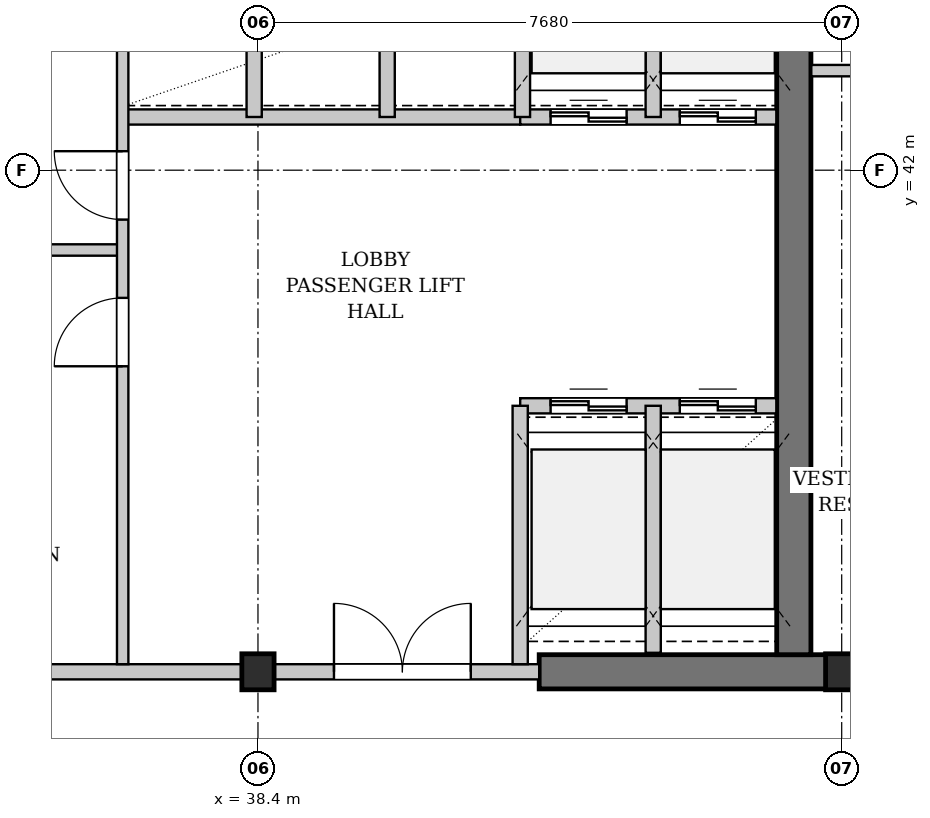
"""IFC4 building model, lengths in metres.
Left out: names, types, materials, properties, quantities, classifications, styles, units other than length and angle.
Written with IfcOpenShell. Run it as: python <this file> out.ifc"""

import sys

from ifc_helpers import new_model, si_unit, direction, frame, frame_2d, origin, origin_2d, place, context, subcontext, project, spatial, rectangle, i_section, extrude, element, fill, save


model = new_model("IFC4")
c1 = context("Model", 3, precision=1e-05, world=origin(), true_north=direction((0.0, 1.0)))
c2 = subcontext(c1, "Body", "Model", "MODEL_VIEW")
j1 = project(units=[si_unit("LENGTHUNIT", "METRE"), si_unit("PLANEANGLEUNIT", "RADIAN")], contexts=[c1])
p1 = place(None, origin())
s1 = spatial("IfcSite", under=j1, at=p1, CompositionType="ELEMENT")
p2 = place(p1, origin())
s2 = spatial("IfcBuilding", under=s1, at=p2, CompositionType="ELEMENT")
p3 = place(p2, frame((0.0, 0.0, 137.3)))
s3 = spatial("IfcBuildingStorey", under=s2, at=p3, CompositionType="ELEMENT", Elevation=137.3)
p4 = place(p3, frame((42.1, 35.4, 0.0), z_axis=(0.0, 0.0, 1.0), x_axis=(1.0, 0.0, 0.0)))
e1 = element("IfcWall", 1, at=p4, inside=s3, PredefinedType="SHEAR", context=c2, shape_type="SweptSolid", body=[
    extrude(rectangle(XDim=8.05, YDim=0.45, at=frame_2d((4.025, 0.0))), origin(), (0.0, 0.0, 1.0), 3.68),
])
p5 = place(p4, frame((4.85, 0.0, 0.0)))
e2 = element("IfcOpeningElement", 2, at=p5, cuts=e1, PredefinedType="OPENING", context=c2, shape_type="SweptSolid", body=[
    extrude(rectangle(XDim=0.9, YDim=2.15, at=frame_2d((0.45, 1.075))), frame((0.0, 0.235, 0.0), z_axis=(0.0, -1.0, 0.0), x_axis=(1.0, 0.0, 0.0)), (0.0, 0.0, 1.0), 0.47),
])
p6 = place(p3, frame((45.45, 35.625, 0.0), z_axis=(0.0, 0.0, 1.0), x_axis=(0.0, 1.0, 0.0)))
e3 = element("IfcWall", 3, at=p6, inside=s3, PredefinedType="SHEAR", context=c2, shape_type="SweptSolid", body=[
    extrude(rectangle(XDim=10.35, YDim=0.45, at=frame_2d((5.175, 0.0))), origin(), (0.0, 0.0, 1.0), 3.68),
])
for number, where, z_axis, x_axis in (
    (4, (38.4, 35.4, 0.0), (0.0, 0.0, 1.0), (1.0, 0.0, 0.0)),
    (5, (46.08, 35.4, 0.0), (0.0, 0.0, 1.0), (1.0, 0.0, 0.0)),
):
    element("IfcColumn", number, at=place(p3, frame(where, z_axis=z_axis, x_axis=x_axis)), inside=s3, PredefinedType="COLUMN", context=c2, shape_type="SweptSolid", body=[
        extrude(i_section(OverallWidth=0.424, OverallDepth=0.474, WebThickness=0.047, FlangeThickness=0.077, FilletRadius=0.015, at=origin_2d()), origin(), (0.0, 0.0, 1.0), 3.9),
    ])
p7 = place(p3, frame((35.6, 35.4, 0.0), z_axis=(0.0, 0.0, 1.0), x_axis=(1.0, 0.0, 0.0)))
e6 = element("IfcWall", 6, at=p7, inside=s3, PredefinedType="PARTITIONING", context=c2, shape_type="SweptSolid", body=[
    extrude(rectangle(XDim=6.5, YDim=0.2, at=frame_2d((3.25, 0.0))), origin(), (0.0, 0.0, 1.0), 2.765),
])
p8 = place(p7, frame((3.8, 0.0, 0.0)))
e7 = element("IfcOpeningElement", 7, at=p8, cuts=e6, PredefinedType="OPENING", context=c2, shape_type="SweptSolid", body=[
    extrude(rectangle(XDim=1.8, YDim=2.3, at=frame_2d((0.9, 1.15))), frame((0.0, 0.11, 0.0), z_axis=(0.0, -1.0, 0.0), x_axis=(1.0, 0.0, 0.0)), (0.0, 0.0, 1.0), 0.22),
])
p9 = place(p3, frame((36.6, 42.7, 0.0), z_axis=(0.0, 0.0, 1.0), x_axis=(1.0, 0.0, 0.0)))
e8 = element("IfcWall", 8, at=p9, inside=s3, PredefinedType="PARTITIONING", context=c2, shape_type="SweptSolid", body=[
    extrude(rectangle(XDim=5.25, YDim=0.2, at=frame_2d((2.625, 0.0))), origin(), (0.0, 0.0, 1.0), 3.68),
])
p10 = place(p3, frame((38.35, 42.7, 0.0), z_axis=(0.0, 0.0, 1.0), x_axis=(0.0, 1.0, 0.0)))
e9 = element("IfcWall", 9, at=p10, inside=s3, PredefinedType="PARTITIONING", context=c2, shape_type="SweptSolid", body=[
    extrude(rectangle(XDim=3.22, YDim=0.2, at=frame_2d((1.61, 0.0))), origin(), (0.0, 0.0, 1.0), 2.765),
])
p11 = place(p3, frame((40.1, 42.7, 0.0), z_axis=(0.0, 0.0, 1.0), x_axis=(0.0, 1.0, 0.0)))
e10 = element("IfcWall", 10, at=p11, inside=s3, PredefinedType="PARTITIONING", context=c2, shape_type="SweptSolid", body=[
    extrude(rectangle(XDim=3.22, YDim=0.2, at=frame_2d((1.61, 0.0))), origin(), (0.0, 0.0, 1.0), 3.68),
])
p12 = place(p3, frame((33.05, 40.95, 0.0), z_axis=(0.0, 0.0, 1.0), x_axis=(1.0, 0.0, 0.0)))
e11 = element("IfcWall", 11, at=p12, inside=s3, PredefinedType="PARTITIONING", context=c2, shape_type="SweptSolid", body=[
    extrude(rectangle(XDim=3.57, YDim=0.15, at=frame_2d((1.785, 0.0))), origin(), (0.0, 0.0, 1.0), 3.68),
])
p13 = place(p3, frame((36.62, 35.5, 0.0), z_axis=(0.0, 0.0, 1.0), x_axis=(0.0, 1.0, 0.0)))
e12 = element("IfcWall", 12, at=p13, inside=s3, PredefinedType="PARTITIONING", context=c2, shape_type="SweptSolid", body=[
    extrude(rectangle(XDim=10.42, YDim=0.15, at=frame_2d((5.21, 0.0))), origin(), (0.0, 0.0, 1.0), 3.68),
])
p14 = place(p13, frame((3.92, 0.0, 0.0)))
e13 = element("IfcOpeningElement", 13, at=p14, cuts=e12, PredefinedType="OPENING", context=c2, shape_type="SweptSolid", body=[
    extrude(rectangle(XDim=0.9, YDim=2.15, at=frame_2d((0.45, 1.075))), frame((0.0, 0.085, 0.0), z_axis=(0.0, -1.0, 0.0), x_axis=(1.0, 0.0, 0.0)), (0.0, 0.0, 1.0), 0.17),
])
p15 = place(p13, frame((5.85, 0.0, 0.0)))
e14 = element("IfcOpeningElement", 14, at=p15, cuts=e12, PredefinedType="OPENING", context=c2, shape_type="SweptSolid", body=[
    extrude(rectangle(XDim=0.9, YDim=2.15, at=frame_2d((0.45, 1.075))), frame((0.0, 0.085, 0.0), z_axis=(0.0, -1.0, 0.0), x_axis=(1.0, 0.0, 0.0)), (0.0, 0.0, 1.0), 0.17),
])
p16 = place(p3, frame((41.85, 38.9, 0.0), z_axis=(0.0, 0.0, 1.0), x_axis=(1.0, 0.0, 0.0)))
e15 = element("IfcWall", 15, at=p16, inside=s3, PredefinedType="PARTITIONING", context=c2, shape_type="SweptSolid", body=[
    extrude(rectangle(XDim=3.37, YDim=0.2, at=frame_2d((1.685, 0.0))), origin(), (0.0, 0.0, 1.0), 3.68),
])
p17 = place(p16, frame((0.4, 0.0, 0.0)))
e16 = element("IfcOpeningElement", 16, at=p17, cuts=e15, PredefinedType="OPENING", context=c2, shape_type="SweptSolid", body=[
    extrude(rectangle(XDim=1.0, YDim=2.2, at=frame_2d((0.5, 1.1))), frame((0.0, 0.11, 0.0), z_axis=(0.0, -1.0, 0.0), x_axis=(1.0, 0.0, 0.0)), (0.0, 0.0, 1.0), 0.22),
])
p18 = place(p16, frame((2.1, 0.0, 0.0)))
e17 = element("IfcOpeningElement", 17, at=p18, cuts=e15, PredefinedType="OPENING", context=c2, shape_type="SweptSolid", body=[
    extrude(rectangle(XDim=1.0, YDim=2.2, at=frame_2d((0.5, 1.1))), frame((0.0, 0.11, 0.0), z_axis=(0.0, -1.0, 0.0), x_axis=(1.0, 0.0, 0.0)), (0.0, 0.0, 1.0), 0.22),
])
p19 = place(p3, frame((41.85, 42.7, 0.0), z_axis=(0.0, 0.0, 1.0), x_axis=(1.0, 0.0, 0.0)))
e18 = element("IfcWall", 18, at=p19, inside=s3, PredefinedType="PARTITIONING", context=c2, shape_type="SweptSolid", body=[
    extrude(rectangle(XDim=3.37, YDim=0.2, at=frame_2d((1.685, 0.0))), origin(), (0.0, 0.0, 1.0), 3.68),
])
p20 = place(p19, frame((0.4, 0.0, 0.0)))
e19 = element("IfcOpeningElement", 19, at=p20, cuts=e18, PredefinedType="OPENING", context=c2, shape_type="SweptSolid", body=[
    extrude(rectangle(XDim=1.0, YDim=2.2, at=frame_2d((0.5, 1.1))), frame((0.0, 0.11, 0.0), z_axis=(0.0, -1.0, 0.0), x_axis=(1.0, 0.0, 0.0)), (0.0, 0.0, 1.0), 0.22),
])
p21 = place(p19, frame((2.1, 0.0, 0.0)))
e20 = element("IfcOpeningElement", 20, at=p21, cuts=e18, PredefinedType="OPENING", context=c2, shape_type="SweptSolid", body=[
    extrude(rectangle(XDim=1.0, YDim=2.2, at=frame_2d((0.5, 1.1))), frame((0.0, 0.11, 0.0), z_axis=(0.0, -1.0, 0.0), x_axis=(1.0, 0.0, 0.0)), (0.0, 0.0, 1.0), 0.22),
])
p22 = place(p3, frame((43.6, 35.65, 0.0), z_axis=(0.0, 0.0, 1.0), x_axis=(0.0, 1.0, 0.0)))
e21 = element("IfcWall", 21, at=p22, inside=s3, PredefinedType="PARTITIONING", context=c2, shape_type="SweptSolid", body=[
    extrude(rectangle(XDim=3.25, YDim=0.2, at=frame_2d((1.625, 0.0))), origin(), (0.0, 0.0, 1.0), 3.68),
])
p23 = place(p3, frame((43.6, 42.7, 0.0), z_axis=(0.0, 0.0, 1.0), x_axis=(0.0, 1.0, 0.0)))
e22 = element("IfcWall", 22, at=p23, inside=s3, PredefinedType="PARTITIONING", context=c2, shape_type="SweptSolid", body=[
    extrude(rectangle(XDim=3.22, YDim=0.2, at=frame_2d((1.61, 0.0))), origin(), (0.0, 0.0, 1.0), 3.68),
])
p24 = place(p3, frame((41.85, 35.5, 0.0), z_axis=(0.0, 0.0, 1.0), x_axis=(0.0, 1.0, 0.0)))
e23 = element("IfcWall", 23, at=p24, inside=s3, PredefinedType="PARTITIONING", context=c2, shape_type="SweptSolid", body=[
    extrude(rectangle(XDim=3.4, YDim=0.2, at=frame_2d((1.7, 0.0))), origin(), (0.0, 0.0, 1.0), 3.68),
])
p25 = place(p3, frame((41.88, 42.7, 0.0), z_axis=(0.0, 0.0, 1.0), x_axis=(0.0, 1.0, 0.0)))
e24 = element("IfcWall", 24, at=p25, inside=s3, PredefinedType="PARTITIONING", context=c2, shape_type="SweptSolid", body=[
    extrude(rectangle(XDim=3.22, YDim=0.2, at=frame_2d((1.61, 0.0))), origin(), (0.0, 0.0, 1.0), 3.68),
])
p26 = place(p3, frame((45.68, 43.31, 0.0), z_axis=(0.0, 0.0, 1.0), x_axis=(1.0, 0.0, 0.0)))
e25 = element("IfcWall", 25, at=p26, inside=s3, PredefinedType="PARTITIONING", context=c2, shape_type="SweptSolid", body=[
    extrude(rectangle(XDim=2.2, YDim=0.15, at=frame_2d((1.1, 0.0))), origin(), (0.0, 0.0, 1.0), 3.68),
])
p27 = place(p26, frame((0.65, 0.0, 0.0)))
e26 = element("IfcOpeningElement", 26, at=p27, cuts=e25, PredefinedType="OPENING", context=c2, shape_type="SweptSolid", body=[
    extrude(rectangle(XDim=0.9, YDim=2.15, at=frame_2d((0.45, 1.075))), frame((0.0, 0.085, 0.0), z_axis=(0.0, -1.0, 0.0), x_axis=(1.0, 0.0, 0.0)), (0.0, 0.0, 1.0), 0.17),
])
p28 = place(p8, origin())
e27 = element("IfcDoor", 27, at=p28, inside=s3, OperationType="DOUBLE_DOOR_SINGLE_SWING", PredefinedType="DOOR", context=c2, shape_type="SweptSolid", body=[
    extrude(rectangle(XDim=1.8, YDim=2.3, at=frame_2d((0.9, 1.15))), frame((0.0, 0.025, 0.0), z_axis=(0.0, -1.0, 0.0), x_axis=(1.0, 0.0, 0.0)), (0.0, 0.0, 1.0), 0.05),
])
fill(e7, e27)
p29 = place(p14, origin())
e28 = element("IfcDoor", 28, at=p29, inside=s3, OperationType="SINGLE_SWING_LEFT", PredefinedType="DOOR", context=c2, shape_type="SweptSolid", body=[
    extrude(rectangle(XDim=0.9, YDim=2.15, at=frame_2d((0.45, 1.075))), frame((0.0, 0.025, 0.0), z_axis=(0.0, -1.0, 0.0), x_axis=(1.0, 0.0, 0.0)), (0.0, 0.0, 1.0), 0.05),
])
fill(e13, e28)
p30 = place(p15, origin())
e29 = element("IfcDoor", 29, at=p30, inside=s3, OperationType="SINGLE_SWING_RIGHT", PredefinedType="DOOR", context=c2, shape_type="SweptSolid", body=[
    extrude(rectangle(XDim=0.9, YDim=2.15, at=frame_2d((0.45, 1.075))), frame((0.0, 0.025, 0.0), z_axis=(0.0, -1.0, 0.0), x_axis=(1.0, 0.0, 0.0)), (0.0, 0.0, 1.0), 0.05),
])
fill(e14, e29)
p31 = place(p17, origin())
e30 = element("IfcDoor", 30, at=p31, inside=s3, OperationType="DOUBLE_DOOR_SLIDING", PredefinedType="DOOR", context=c2, shape_type="SweptSolid", body=[
    extrude(rectangle(XDim=1.0, YDim=2.2, at=frame_2d((0.5, 1.1))), frame((0.0, 0.025, 0.0), z_axis=(0.0, -1.0, 0.0), x_axis=(1.0, 0.0, 0.0)), (0.0, 0.0, 1.0), 0.05),
])
fill(e16, e30)
p32 = place(p18, origin())
e31 = element("IfcDoor", 31, at=p32, inside=s3, OperationType="DOUBLE_DOOR_SLIDING", PredefinedType="DOOR", context=c2, shape_type="SweptSolid", body=[
    extrude(rectangle(XDim=1.0, YDim=2.2, at=frame_2d((0.5, 1.1))), frame((0.0, 0.025, 0.0), z_axis=(0.0, -1.0, 0.0), x_axis=(1.0, 0.0, 0.0)), (0.0, 0.0, 1.0), 0.05),
])
fill(e17, e31)
p33 = place(p20, origin())
e32 = element("IfcDoor", 32, at=p33, inside=s3, OperationType="DOUBLE_DOOR_SLIDING", PredefinedType="DOOR", context=c2, shape_type="SweptSolid", body=[
    extrude(rectangle(XDim=1.0, YDim=2.2, at=frame_2d((0.5, 1.1))), frame((0.0, 0.025, 0.0), z_axis=(0.0, -1.0, 0.0), x_axis=(1.0, 0.0, 0.0)), (0.0, 0.0, 1.0), 0.05),
])
fill(e19, e32)
p34 = place(p21, origin())
e33 = element("IfcDoor", 33, at=p34, inside=s3, OperationType="DOUBLE_DOOR_SLIDING", PredefinedType="DOOR", context=c2, shape_type="SweptSolid", body=[
    extrude(rectangle(XDim=1.0, YDim=2.2, at=frame_2d((0.5, 1.1))), frame((0.0, 0.025, 0.0), z_axis=(0.0, -1.0, 0.0), x_axis=(1.0, 0.0, 0.0)), (0.0, 0.0, 1.0), 0.05),
])
fill(e20, e33)
save(model, sys.argv[1])
